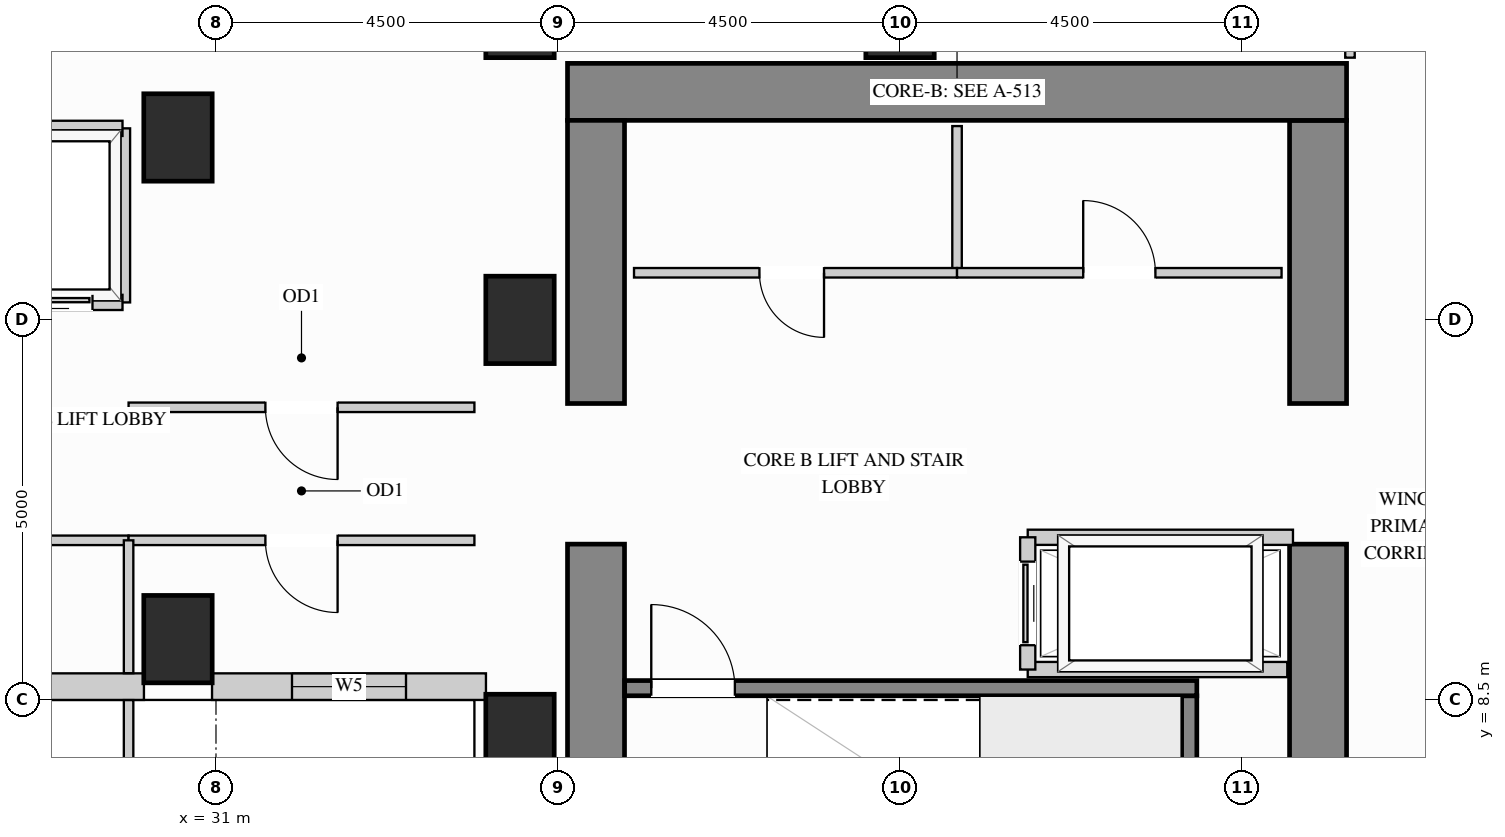
"""IFC4 building model, lengths in metres.
Left out: names, types, materials, properties, quantities, classifications, styles, units other than length and angle.
Written with IfcOpenShell. Run it as: python <this file> out.ifc"""

import sys

from ifc_helpers import new_model, si_unit, direction, frame, frame_2d, origin, origin_2d, place, context, subcontext, project, spatial, rectangle, extrude, source, transform, mapped, element, fill, save


model = new_model("IFC4")
c1 = context("Model", 3, precision=1e-05, world=origin(), true_north=direction((0.0, 1.0)))
c2 = subcontext(c1, "Body", "Model", "MODEL_VIEW")
j1 = project(units=[si_unit("LENGTHUNIT", "METRE"), si_unit("PLANEANGLEUNIT", "RADIAN")], contexts=[c1])
p1 = place(None, origin())
s1 = spatial("IfcSite", under=j1, at=p1, CompositionType="ELEMENT")
p2 = place(p1, origin())
s2 = spatial("IfcBuilding", under=s1, at=p2, CompositionType="ELEMENT")
p3 = place(p2, frame((0.0, 0.0, 95.4)))
s3 = spatial("IfcBuildingStorey", under=s2, at=p3, CompositionType="ELEMENT", Elevation=95.4)
m1 = source(origin(), c2, "Body", "SweptSolid", [
    extrude(rectangle(XDim=0.9, YDim=0.9, at=origin_2d()), origin(), (0.0, 0.0, 1.0), 3.38),
])
for number, where, z_axis, x_axis in (
    (1, (35.0, 17.4, 0.0), (0.0, 0.0, 1.0), (1.0, 0.0, 0.0)),
    (2, (40.0, 17.4, 0.0), (0.0, 0.0, 1.0), (1.0, 0.0, 0.0)),
):
    element("IfcColumn", number, at=place(p3, frame(where, z_axis=z_axis, x_axis=x_axis)), inside=s3, PredefinedType="COLUMN", context=c2, shape_type="MappedRepresentation", body=[
        mapped(m1, transform((0.0, 0.0, 0.0), x_axis=(1.0, 0.0, 0.0), y_axis=(0.0, 1.0, 0.0), z_axis=(0.0, 0.0, 1.0))),
    ])
m2 = source(origin(), c2, "Body", "SweptSolid", [
    extrude(rectangle(XDim=0.9, YDim=1.15, at=origin_2d()), origin(), (0.0, 0.0, 1.0), 3.38),
])
for number, where, z_axis, x_axis in (
    (3, (35.0, 13.5, 0.0), (0.0, 0.0, 1.0), (1.0, 0.0, 0.0)),
    (4, (35.0, 8.0, 0.0), (0.0, 0.0, 1.0), (1.0, 0.0, 0.0)),
    (5, (30.5, 15.9, 0.0), (0.0, 0.0, 1.0), (1.0, 0.0, 0.0)),
    (6, (30.5, 9.3, 0.0), (0.0, 0.0, 1.0), (1.0, 0.0, 0.0)),
):
    element("IfcColumn", number, at=place(p3, frame(where, z_axis=z_axis, x_axis=x_axis)), inside=s3, PredefinedType="COLUMN", context=c2, shape_type="MappedRepresentation", body=[
        mapped(m2, transform((0.0, 0.0, 0.0), x_axis=(1.0, 0.0, 0.0), y_axis=(0.0, 1.0, 0.0), z_axis=(0.0, 0.0, 1.0))),
    ])
m3 = source(origin(), c2, "Body", "SweptSolid", [
    extrude(rectangle(XDim=5.675, YDim=0.75, at=frame_2d((2.837, 0.0))), origin(), (0.0, 0.0, 1.0), 3.38),
])
p4 = place(p3, frame((45.5, 4.875, 0.0), z_axis=(0.0, 0.0, 1.0), x_axis=(0.0, 1.0, 0.0)))
e7 = element("IfcWall", 7, at=p4, inside=s3, PredefinedType="SHEAR", context=c2, shape_type="MappedRepresentation", body=[
    mapped(m3, transform((0.0, 0.0, 0.0), x_axis=(1.0, 0.0, 0.0), y_axis=(0.0, 1.0, 0.0), z_axis=(0.0, 0.0, 1.0))),
])
m4 = source(origin(), c2, "Body", "SweptSolid", [
    extrude(rectangle(XDim=3.725, YDim=0.75, at=frame_2d((1.863, 0.0))), origin(), (0.0, 0.0, 1.0), 3.38),
])
p5 = place(p3, frame((45.5, 12.4, 0.0), z_axis=(0.0, 0.0, 1.0), x_axis=(0.0, 1.0, 0.0)))
e8 = element("IfcWall", 8, at=p5, inside=s3, PredefinedType="SHEAR", context=c2, shape_type="MappedRepresentation", body=[
    mapped(m4, transform((0.0, 0.0, 0.0), x_axis=(1.0, 0.0, 0.0), y_axis=(0.0, 1.0, 0.0), z_axis=(0.0, 0.0, 1.0))),
])
m5 = source(origin(), c2, "Body", "SweptSolid", [
    extrude(rectangle(XDim=10.25, YDim=0.75, at=frame_2d((5.125, 0.0))), origin(), (0.0, 0.0, 1.0), 3.38),
])
p6 = place(p3, frame((35.625, 16.5, 0.0), z_axis=(0.0, 0.0, 1.0), x_axis=(1.0, 0.0, 0.0)))
e9 = element("IfcWall", 9, at=p6, inside=s3, PredefinedType="SHEAR", context=c2, shape_type="MappedRepresentation", body=[
    mapped(m5, transform((0.0, 0.0, 0.0), x_axis=(1.0, 0.0, 0.0), y_axis=(0.0, 1.0, 0.0), z_axis=(0.0, 0.0, 1.0))),
])
p7 = place(p3, frame((36.0, 4.875, 0.0), z_axis=(0.0, 0.0, 1.0), x_axis=(0.0, 1.0, 0.0)))
e10 = element("IfcWall", 10, at=p7, inside=s3, PredefinedType="SHEAR", context=c2, shape_type="MappedRepresentation", body=[
    mapped(m3, transform((0.0, 0.0, 0.0), x_axis=(1.0, 0.0, 0.0), y_axis=(0.0, 1.0, 0.0), z_axis=(0.0, 0.0, 1.0))),
])
p8 = place(p3, frame((36.0, 12.4, 0.0), z_axis=(0.0, 0.0, 1.0), x_axis=(0.0, 1.0, 0.0)))
e11 = element("IfcWall", 11, at=p8, inside=s3, PredefinedType="SHEAR", context=c2, shape_type="MappedRepresentation", body=[
    mapped(m4, transform((0.0, 0.0, 0.0), x_axis=(1.0, 0.0, 0.0), y_axis=(0.0, 1.0, 0.0), z_axis=(0.0, 0.0, 1.0))),
])
p9 = place(p3, frame((23.848, 8.675, 0.0), z_axis=(0.0, 0.0, 1.0), x_axis=(1.0, 0.0, 0.0)))
e12 = element("IfcWall", 12, at=p9, inside=s3, PredefinedType="SOLIDWALL", context=c2, shape_type="SweptSolid", body=[
    extrude(rectangle(XDim=6.204, YDim=0.35, at=frame_2d((3.102, 0.0))), origin(), (0.0, 0.0, 1.0), 3.365),
])
p10 = place(p9, frame((1.131, 0.0, 0.78)))
e13 = element("IfcOpeningElement", 13, at=p10, cuts=e12, PredefinedType="OPENING", context=c2, shape_type="SweptSolid", body=[
    extrude(rectangle(XDim=1.5, YDim=2.0, at=frame_2d((0.75, 1.0))), frame((0.0, 0.185, 0.0), z_axis=(0.0, -1.0, 0.0), x_axis=(1.0, 0.0, 0.0)), (0.0, 0.0, 1.0), 0.37),
])
p11 = place(p9, frame((3.441, 0.0, 0.78)))
e14 = element("IfcOpeningElement", 14, at=p11, cuts=e12, PredefinedType="OPENING", context=c2, shape_type="SweptSolid", body=[
    extrude(rectangle(XDim=1.5, YDim=2.0, at=frame_2d((0.75, 1.0))), frame((0.0, 0.185, 0.0), z_axis=(0.0, -1.0, 0.0), x_axis=(1.0, 0.0, 0.0)), (0.0, 0.0, 1.0), 0.37),
])
p12 = place(p3, frame((30.948, 8.675, 0.0), z_axis=(0.0, 0.0, 1.0), x_axis=(1.0, 0.0, 0.0)))
e15 = element("IfcWall", 15, at=p12, inside=s3, PredefinedType="SOLIDWALL", context=c2, shape_type="SweptSolid", body=[
    extrude(rectangle(XDim=3.604, YDim=0.35, at=frame_2d((1.802, 0.0))), origin(), (0.0, 0.0, 1.0), 3.365),
])
p13 = place(p12, frame((1.052, 0.0, 0.78)))
e16 = element("IfcOpeningElement", 16, at=p13, cuts=e15, PredefinedType="OPENING", context=c2, shape_type="SweptSolid", body=[
    extrude(rectangle(XDim=1.5, YDim=2.0, at=frame_2d((0.75, 1.0))), frame((0.0, 0.185, 0.0), z_axis=(0.0, -1.0, 0.0), x_axis=(1.0, 0.0, 0.0)), (0.0, 0.0, 1.0), 0.37),
])
m6 = source(origin(), c2, "Body", "SweptSolid", [
    extrude(rectangle(XDim=1.93, YDim=0.125, at=frame_2d((0.965, 0.0))), origin(), (0.0, 0.0, 1.0), 3.365),
])
p14 = place(p3, frame((40.75, 14.12, 0.0), z_axis=(0.0, 0.0, 1.0), x_axis=(0.0, 1.0, 0.0)))
e17 = element("IfcWall", 17, at=p14, inside=s3, PredefinedType="PARTITIONING", context=c2, shape_type="MappedRepresentation", body=[
    mapped(m6, transform((0.0, 0.0, 0.0), x_axis=(1.0, 0.0, 0.0), y_axis=(0.0, 1.0, 0.0), z_axis=(0.0, 0.0, 1.0))),
])
p15 = place(p3, frame((36.5, 14.12, 0.0), z_axis=(0.0, 0.0, 1.0), x_axis=(1.0, 0.0, 0.0)))
e18 = element("IfcWall", 18, at=p15, inside=s3, PredefinedType="PARTITIONING", context=c2, shape_type="SweptSolid", body=[
    extrude(rectangle(XDim=4.25, YDim=0.125, at=frame_2d((2.125, 0.0))), origin(), (0.0, 0.0, 1.0), 3.365),
])
p16 = place(p15, frame((1.65, 0.0, 0.0)))
e19 = element("IfcOpeningElement", 19, at=p16, cuts=e18, PredefinedType="OPENING", context=c2, shape_type="SweptSolid", body=[
    extrude(rectangle(XDim=0.85, YDim=2.1, at=frame_2d((0.425, 1.05))), frame((0.0, 0.073, 0.0), z_axis=(0.0, -1.0, 0.0), x_axis=(1.0, 0.0, 0.0)), (0.0, 0.0, 1.0), 0.145),
])
p17 = place(p3, frame((40.75, 14.12, 0.0), z_axis=(0.0, 0.0, 1.0), x_axis=(1.0, 0.0, 0.0)))
e20 = element("IfcWall", 20, at=p17, inside=s3, PredefinedType="PARTITIONING", context=c2, shape_type="SweptSolid", body=[
    extrude(rectangle(XDim=4.27, YDim=0.125, at=frame_2d((2.135, 0.0))), origin(), (0.0, 0.0, 1.0), 3.365),
])
p18 = place(p17, frame((1.66, 0.0, 0.0)))
e21 = element("IfcOpeningElement", 21, at=p18, cuts=e20, PredefinedType="OPENING", context=c2, shape_type="SweptSolid", body=[
    extrude(rectangle(XDim=0.95, YDim=2.15, at=frame_2d((0.475, 1.075))), frame((0.0, 0.073, 0.0), z_axis=(0.0, -1.0, 0.0), x_axis=(1.0, 0.0, 0.0)), (0.0, 0.0, 1.0), 0.145),
])
p19 = place(p3, frame((45.92, 16.95, 0.0), z_axis=(0.0, 0.0, 1.0), x_axis=(0.0, 1.0, 0.0)))
e22 = element("IfcWall", 22, at=p19, inside=s3, PredefinedType="PARTITIONING", context=c2, shape_type="SweptSolid", body=[
    extrude(rectangle(XDim=2.9, YDim=0.125, at=frame_2d((1.45, 0.0))), origin(), (0.0, 0.0, 1.0), 3.365),
])
p20 = place(p19, frame((1.543, 0.0, 0.0)))
e23 = element("IfcOpeningElement", 23, at=p20, cuts=e22, PredefinedType="OPENING", context=c2, shape_type="SweptSolid", body=[
    extrude(rectangle(XDim=0.95, YDim=2.15, at=frame_2d((0.475, 1.075))), frame((0.0, 0.073, 0.0), z_axis=(0.0, -1.0, 0.0), x_axis=(1.0, 0.0, 0.0)), (0.0, 0.0, 1.0), 0.145),
])
p21 = place(p3, frame((29.85, 12.35, 0.0), z_axis=(0.0, 0.0, 1.0), x_axis=(1.0, 0.0, 0.0)))
e24 = element("IfcWall", 24, at=p21, inside=s3, PredefinedType="PARTITIONING", context=c2, shape_type="SweptSolid", body=[
    extrude(rectangle(XDim=4.55, YDim=0.125, at=frame_2d((2.275, 0.0))), origin(), (0.0, 0.0, 1.0), 3.365),
])
p22 = place(p21, frame((1.8, 0.0, 0.0)))
e25 = element("IfcOpeningElement", 25, at=p22, cuts=e24, PredefinedType="OPENING", context=c2, shape_type="SweptSolid", body=[
    extrude(rectangle(XDim=0.95, YDim=2.15, at=frame_2d((0.475, 1.075))), frame((0.0, 0.073, 0.0), z_axis=(0.0, -1.0, 0.0), x_axis=(1.0, 0.0, 0.0)), (0.0, 0.0, 1.0), 0.145),
])
p23 = place(p3, frame((23.85, 10.6, 0.0), z_axis=(0.0, 0.0, 1.0), x_axis=(1.0, 0.0, 0.0)))
e26 = element("IfcWall", 26, at=p23, inside=s3, PredefinedType="PARTITIONING", context=c2, shape_type="SweptSolid", body=[
    extrude(rectangle(XDim=6.0, YDim=0.125, at=frame_2d((3.0, 0.0))), origin(), (0.0, 0.0, 1.0), 3.365),
])
p24 = place(p23, frame((2.525, 0.0, 0.0)))
e27 = element("IfcOpeningElement", 27, at=p24, cuts=e26, PredefinedType="OPENING", context=c2, shape_type="SweptSolid", body=[
    extrude(rectangle(XDim=0.95, YDim=2.15, at=frame_2d((0.475, 1.075))), frame((0.0, 0.073, 0.0), z_axis=(0.0, -1.0, 0.0), x_axis=(1.0, 0.0, 0.0)), (0.0, 0.0, 1.0), 0.145),
])
p25 = place(p3, frame((29.85, 10.6, 0.0), z_axis=(0.0, 0.0, 1.0), x_axis=(1.0, 0.0, 0.0)))
e28 = element("IfcWall", 28, at=p25, inside=s3, PredefinedType="PARTITIONING", context=c2, shape_type="SweptSolid", body=[
    extrude(rectangle(XDim=4.55, YDim=0.125, at=frame_2d((2.275, 0.0))), origin(), (0.0, 0.0, 1.0), 3.365),
])
p26 = place(p25, frame((1.8, 0.0, 0.0)))
e29 = element("IfcOpeningElement", 29, at=p26, cuts=e28, PredefinedType="OPENING", context=c2, shape_type="SweptSolid", body=[
    extrude(rectangle(XDim=0.95, YDim=2.15, at=frame_2d((0.475, 1.075))), frame((0.0, 0.073, 0.0), z_axis=(0.0, -1.0, 0.0), x_axis=(1.0, 0.0, 0.0)), (0.0, 0.0, 1.0), 0.145),
])
m7 = source(origin(), c2, "Body", "SweptSolid", [
    extrude(rectangle(XDim=8.148, YDim=0.125, at=frame_2d((4.074, 0.0))), origin(), (0.0, 0.0, 1.0), 3.365),
])
p27 = place(p3, frame((29.85, 0.35, 0.0), z_axis=(0.0, 0.0, 1.0), x_axis=(0.0, 1.0, 0.0)))
e30 = element("IfcWall", 30, at=p27, inside=s3, PredefinedType="PARTITIONING", context=c2, shape_type="MappedRepresentation", body=[
    mapped(m7, transform((0.0, 0.0, 0.0), x_axis=(1.0, 0.0, 0.0), y_axis=(0.0, 1.0, 0.0), z_axis=(0.0, 0.0, 1.0))),
])
m8 = source(origin(), c2, "Body", "SweptSolid", [
    extrude(rectangle(XDim=1.748, YDim=0.125, at=frame_2d((0.874, 0.0))), origin(), (0.0, 0.0, 1.0), 3.365),
])
p28 = place(p3, frame((29.85, 8.852, 0.0), z_axis=(0.0, 0.0, 1.0), x_axis=(0.0, 1.0, 0.0)))
e31 = element("IfcWall", 31, at=p28, inside=s3, PredefinedType="PARTITIONING", context=c2, shape_type="MappedRepresentation", body=[
    mapped(m8, transform((0.0, 0.0, 0.0), x_axis=(1.0, 0.0, 0.0), y_axis=(0.0, 1.0, 0.0), z_axis=(0.0, 0.0, 1.0))),
])
m9 = source(origin(), c2, "Body", "SweptSolid", [
    extrude(rectangle(XDim=2.29, YDim=0.2, at=frame_2d((1.145, 0.0))), origin(), (0.0, 0.0, 1.0), 3.365),
])
p29 = place(p3, frame((29.77, 13.73, 0.0), z_axis=(0.0, 0.0, 1.0), x_axis=(0.0, 1.0, 0.0)))
e32 = element("IfcWall", 32, at=p29, inside=s3, PredefinedType="PARTITIONING", context=c2, shape_type="MappedRepresentation", body=[
    mapped(m9, transform((0.0, 0.0, 0.0), x_axis=(1.0, 0.0, 0.0), y_axis=(0.0, 1.0, 0.0), z_axis=(0.0, 0.0, 1.0))),
])
m10 = source(origin(), c2, "Body", "SweptSolid", [
    extrude(rectangle(XDim=1.89, YDim=0.2, at=frame_2d((0.945, 0.0))), origin(), (0.0, 0.0, 1.0), 2.677),
])
p30 = place(p3, frame((27.88, 16.02, 0.0), z_axis=(0.0, 0.0, 1.0), x_axis=(1.0, 0.0, 0.0)))
e33 = element("IfcWall", 33, at=p30, inside=s3, PredefinedType="PARTITIONING", context=c2, shape_type="MappedRepresentation", body=[
    mapped(m10, transform((0.0, 0.0, 0.0), x_axis=(1.0, 0.0, 0.0), y_axis=(0.0, 1.0, 0.0), z_axis=(0.0, 0.0, 1.0))),
])
p31 = place(p3, frame((27.88, 13.73, 0.0), z_axis=(0.0, 0.0, 1.0), x_axis=(1.0, 0.0, 0.0)))
e34 = element("IfcWall", 34, at=p31, inside=s3, PredefinedType="PARTITIONING", context=c2, shape_type="SweptSolid", body=[
    extrude(rectangle(XDim=1.89, YDim=0.2, at=frame_2d((0.945, 0.0))), origin(), (0.0, 0.0, 1.0), 2.446),
])
p32 = place(p31, frame((0.395, 0.0, 0.0)))
e35 = element("IfcOpeningElement", 35, at=p32, cuts=e34, PredefinedType="OPENING", context=c2, shape_type="SweptSolid", body=[
    extrude(rectangle(XDim=1.1, YDim=2.2, at=frame_2d((0.55, 1.1))), frame((0.0, 0.11, 0.0), z_axis=(0.0, -1.0, 0.0), x_axis=(1.0, 0.0, 0.0)), (0.0, 0.0, 1.0), 0.22),
])
m11 = source(origin(), c2, "Body", "SweptSolid", [
    extrude(rectangle(XDim=3.49, YDim=0.2, at=frame_2d((1.745, 0.0))), origin(), (0.0, 0.0, 1.0), 3.365),
])
p33 = place(p3, frame((41.68, 10.64, 0.0), z_axis=(0.0, 0.0, 1.0), x_axis=(1.0, 0.0, 0.0)))
e36 = element("IfcWall", 36, at=p33, inside=s3, PredefinedType="PARTITIONING", context=c2, shape_type="MappedRepresentation", body=[
    mapped(m11, transform((0.0, 0.0, 0.0), x_axis=(1.0, 0.0, 0.0), y_axis=(0.0, 1.0, 0.0), z_axis=(0.0, 0.0, 1.0))),
])
m12 = source(origin(), c2, "Body", "SweptSolid", [
    extrude(rectangle(XDim=3.415, YDim=0.2, at=frame_2d((1.708, 0.0))), origin(), (0.0, 0.0, 1.0), 3.365),
])
p34 = place(p3, frame((41.68, 8.9, 0.0), z_axis=(0.0, 0.0, 1.0), x_axis=(1.0, 0.0, 0.0)))
e37 = element("IfcWall", 37, at=p34, inside=s3, PredefinedType="PARTITIONING", context=c2, shape_type="MappedRepresentation", body=[
    mapped(m12, transform((0.0, 0.0, 0.0), x_axis=(1.0, 0.0, 0.0), y_axis=(0.0, 1.0, 0.0), z_axis=(0.0, 0.0, 1.0))),
])
p35 = place(p3, frame((41.68, 8.9, 0.0), z_axis=(0.0, 0.0, 1.0), x_axis=(0.0, 1.0, 0.0)))
e38 = element("IfcWall", 38, at=p35, inside=s3, PredefinedType="PARTITIONING", context=c2, shape_type="SweptSolid", body=[
    extrude(rectangle(XDim=1.74, YDim=0.2, at=frame_2d((0.87, 0.0))), origin(), (0.0, 0.0, 1.0), 3.365),
])
p36 = place(p35, frame((0.32, 0.0, 0.0)))
e39 = element("IfcOpeningElement", 39, at=p36, cuts=e38, PredefinedType="OPENING", context=c2, shape_type="SweptSolid", body=[
    extrude(rectangle(XDim=1.1, YDim=2.2, at=frame_2d((0.55, 1.1))), frame((0.0, 0.11, 0.0), z_axis=(0.0, -1.0, 0.0), x_axis=(1.0, 0.0, 0.0)), (0.0, 0.0, 1.0), 0.22),
])
m13 = source(origin(), c2, "Body", "SweptSolid", [
    extrude(rectangle(XDim=3.678, YDim=0.2, at=frame_2d((1.839, 0.0))), origin(), (0.0, 0.0, 1.0), 3.38),
])
p37 = place(p3, frame((43.805, 4.877, 0.0), z_axis=(0.0, 0.0, 1.0), x_axis=(0.0, 1.0, 0.0)))
e40 = element("IfcWall", 40, at=p37, inside=s3, PredefinedType="SHEAR", context=c2, shape_type="MappedRepresentation", body=[
    mapped(m13, transform((0.0, 0.0, 0.0), x_axis=(1.0, 0.0, 0.0), y_axis=(0.0, 1.0, 0.0), z_axis=(0.0, 0.0, 1.0))),
])
p38 = place(p3, frame((36.377, 8.655, 0.0), z_axis=(0.0, 0.0, 1.0), x_axis=(1.0, 0.0, 0.0)))
e41 = element("IfcWall", 41, at=p38, inside=s3, PredefinedType="SHEAR", context=c2, shape_type="SweptSolid", body=[
    extrude(rectangle(XDim=7.528, YDim=0.2, at=frame_2d((3.764, 0.0))), origin(), (0.0, 0.0, 1.0), 3.38),
])
p39 = place(p38, frame((0.35, 0.0, 0.0)))
e42 = element("IfcOpeningElement", 42, at=p39, cuts=e41, PredefinedType="OPENING", context=c2, shape_type="SweptSolid", body=[
    extrude(rectangle(XDim=1.1, YDim=2.15, at=frame_2d((0.55, 1.075))), frame((0.0, 0.11, 0.0), z_axis=(0.0, -1.0, 0.0), x_axis=(1.0, 0.0, 0.0)), (0.0, 0.0, 1.0), 0.22),
])
m14 = source(origin(), c2, "Body", "SweptSolid", [
    extrude(rectangle(XDim=1.1, YDim=2.2, at=frame_2d((0.55, 1.1))), frame((0.0, 0.025, 0.0), z_axis=(0.0, -1.0, 0.0), x_axis=(1.0, 0.0, 0.0)), (0.0, 0.0, 1.0), 0.05),
])
p40 = place(p32, origin())
e43 = element("IfcDoor", 43, at=p40, inside=s3, OperationType="SLIDING_TO_LEFT", PredefinedType="DOOR", context=c2, shape_type="MappedRepresentation", body=[
    mapped(m14, transform((0.0, 0.0, 0.0), x_axis=(1.0, 0.0, 0.0), y_axis=(0.0, 1.0, 0.0), z_axis=(0.0, 0.0, 1.0))),
])
fill(e35, e43)
p41 = place(p36, origin())
e44 = element("IfcDoor", 44, at=p41, inside=s3, OperationType="SLIDING_TO_LEFT", PredefinedType="DOOR", context=c2, shape_type="MappedRepresentation", body=[
    mapped(m14, transform((0.0, 0.0, 0.0), x_axis=(1.0, 0.0, 0.0), y_axis=(0.0, 1.0, 0.0), z_axis=(0.0, 0.0, 1.0))),
])
fill(e39, e44)
m15 = source(origin(), c2, "Body", "SweptSolid", [
    extrude(rectangle(XDim=0.95, YDim=2.15, at=frame_2d((0.475, 1.075))), frame((0.0, 0.025, 0.0), z_axis=(0.0, -1.0, 0.0), x_axis=(1.0, 0.0, 0.0)), (0.0, 0.0, 1.0), 0.05),
])
p42 = place(p18, origin())
e45 = element("IfcDoor", 45, at=p42, inside=s3, OperationType="SINGLE_SWING_LEFT", PredefinedType="DOOR", context=c2, shape_type="MappedRepresentation", body=[
    mapped(m15, transform((0.0, 0.0, 0.0), x_axis=(1.0, 0.0, 0.0), y_axis=(0.0, 1.0, 0.0), z_axis=(0.0, 0.0, 1.0))),
])
fill(e21, e45)
p43 = place(p22, origin())
e46 = element("IfcDoor", 46, at=p43, inside=s3, OperationType="SINGLE_SWING_RIGHT", PredefinedType="DOOR", context=c2, shape_type="MappedRepresentation", body=[
    mapped(m15, transform((0.0, 0.0, 0.0), x_axis=(1.0, 0.0, 0.0), y_axis=(0.0, 1.0, 0.0), z_axis=(0.0, 0.0, 1.0))),
])
fill(e25, e46)
p44 = place(p26, origin())
e47 = element("IfcDoor", 47, at=p44, inside=s3, OperationType="SINGLE_SWING_RIGHT", PredefinedType="DOOR", context=c2, shape_type="MappedRepresentation", body=[
    mapped(m15, transform((0.0, 0.0, 0.0), x_axis=(1.0, 0.0, 0.0), y_axis=(0.0, 1.0, 0.0), z_axis=(0.0, 0.0, 1.0))),
])
fill(e29, e47)
m16 = source(origin(), c2, "Body", "SweptSolid", [
    extrude(rectangle(XDim=0.85, YDim=2.1, at=frame_2d((0.425, 1.05))), frame((0.0, 0.025, 0.0), z_axis=(0.0, -1.0, 0.0), x_axis=(1.0, 0.0, 0.0)), (0.0, 0.0, 1.0), 0.05),
])
p45 = place(p16, origin())
e48 = element("IfcDoor", 48, at=p45, inside=s3, OperationType="SINGLE_SWING_RIGHT", PredefinedType="DOOR", context=c2, shape_type="MappedRepresentation", body=[
    mapped(m16, transform((0.0, 0.0, 0.0), x_axis=(1.0, 0.0, 0.0), y_axis=(0.0, 1.0, 0.0), z_axis=(0.0, 0.0, 1.0))),
])
fill(e19, e48)
m17 = source(origin(), c2, "Body", "SweptSolid", [
    extrude(rectangle(XDim=1.1, YDim=2.15, at=frame_2d((0.55, 1.075))), frame((0.0, 0.025, 0.0), z_axis=(0.0, -1.0, 0.0), x_axis=(1.0, 0.0, 0.0)), (0.0, 0.0, 1.0), 0.05),
])
p46 = place(p39, origin())
e49 = element("IfcDoor", 49, at=p46, inside=s3, OperationType="SINGLE_SWING_LEFT", PredefinedType="DOOR", context=c2, shape_type="MappedRepresentation", body=[
    mapped(m17, transform((0.0, 0.0, 0.0), x_axis=(1.0, 0.0, 0.0), y_axis=(0.0, 1.0, 0.0), z_axis=(0.0, 0.0, 1.0))),
])
fill(e42, e49)
m18 = source(origin(), c2, "Body", "SweptSolid", [
    extrude(rectangle(XDim=1.5, YDim=2.0, at=frame_2d((0.75, 1.0))), frame((0.0, 0.03, 0.0), z_axis=(0.0, -1.0, 0.0), x_axis=(1.0, 0.0, 0.0)), (0.0, 0.0, 1.0), 0.06),
])
p47 = place(p13, origin())
e50 = element("IfcWindow", 50, at=p47, inside=s3, PartitioningType="SINGLE_PANEL", PredefinedType="WINDOW", context=c2, shape_type="MappedRepresentation", body=[
    mapped(m18, transform((0.0, 0.0, 0.0), x_axis=(1.0, 0.0, 0.0), y_axis=(0.0, 1.0, 0.0), z_axis=(0.0, 0.0, 1.0))),
])
fill(e16, e50)
save(model, sys.argv[1])
